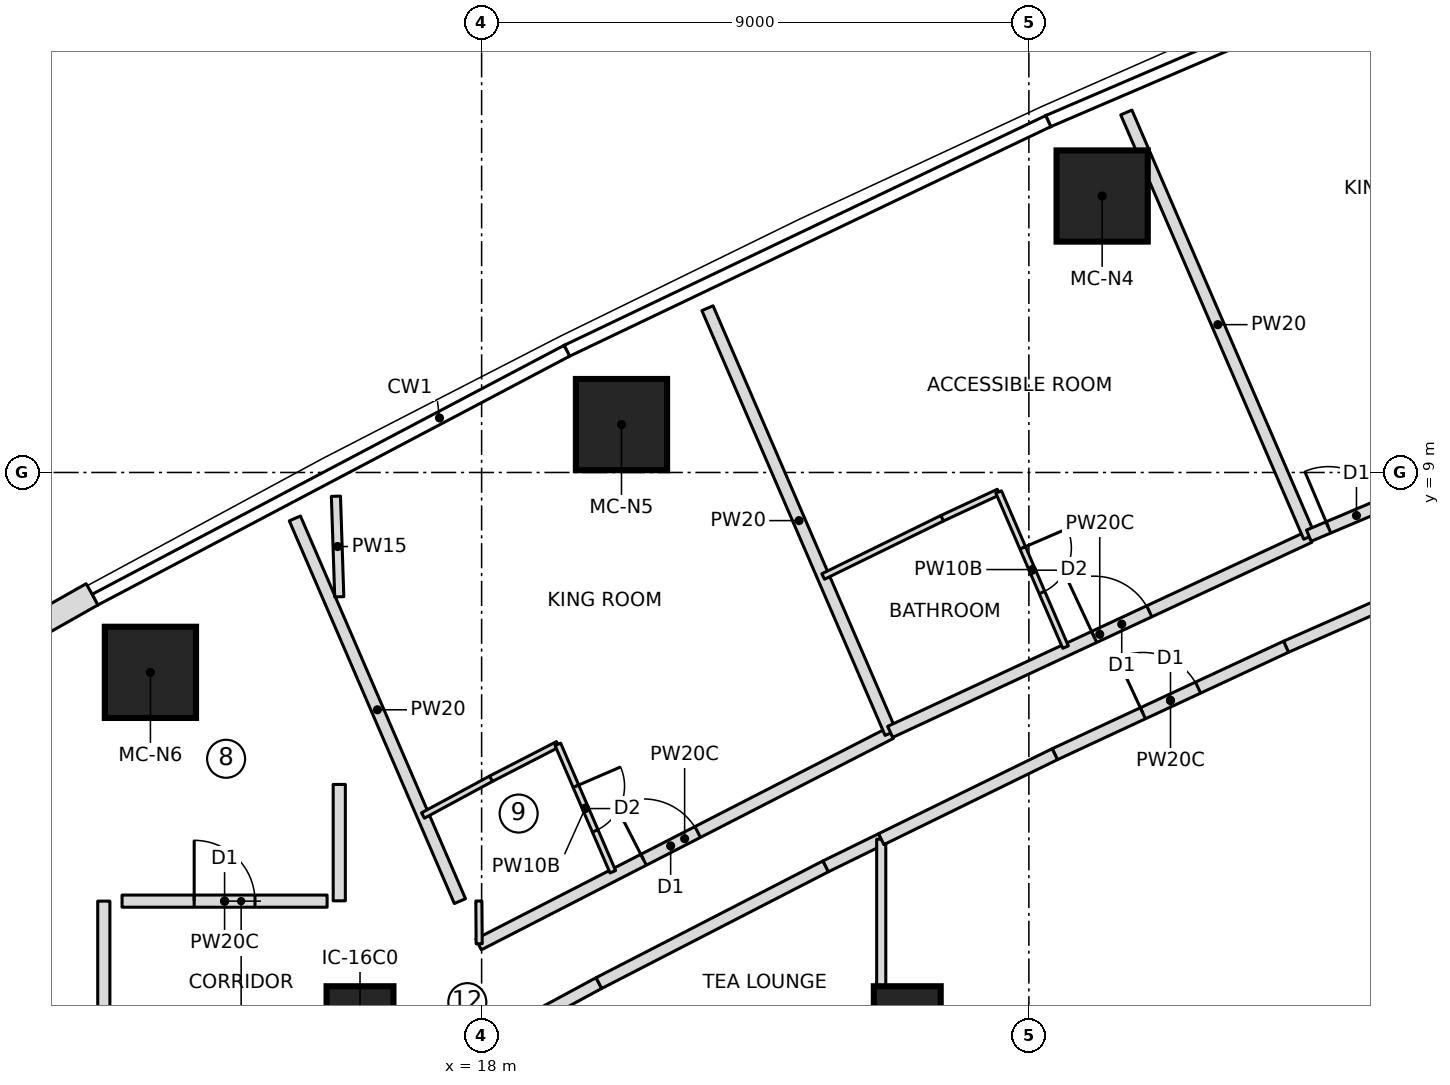
"""IFC4 building model, lengths in metres.
Left out: names, types, materials, properties, quantities, classifications, styles, units other than length and angle.
Written with IfcOpenShell. Run it as: python <this file> out.ifc"""

import sys

from ifc_helpers import new_model, si_unit, direction, frame, frame_2d, origin, origin_2d, place, context, subcontext, project, spatial, polyline, rectangle, outline, extrude, element, fill, save


model = new_model("IFC4")
c1 = context("Model", 3, precision=1e-05, world=origin(), true_north=direction((0.0, 1.0)))
c2 = subcontext(c1, "Body", "Model", "MODEL_VIEW")
j1 = project(units=[si_unit("LENGTHUNIT", "METRE"), si_unit("PLANEANGLEUNIT", "RADIAN")], contexts=[c1])
p1 = place(None, origin())
s1 = spatial("IfcSite", under=j1, at=p1, CompositionType="ELEMENT")
p2 = place(p1, origin())
s2 = spatial("IfcBuilding", under=s1, at=p2, CompositionType="ELEMENT")
p3 = place(p2, frame((0.0, 0.0, 162.15)))
s3 = spatial("IfcBuildingStorey", under=s2, at=p3, CompositionType="ELEMENT", Elevation=162.15)
for number, where, z_axis, x_axis in (
    (1, (28.205, 13.547, 0.0), (0.0, 0.0, 1.0), (1.0, 0.0, 0.0)),
    (2, (20.3, 9.788, 0.0), (0.0, 0.0, 1.0), (1.0, 0.0, 0.0)),
    (3, (12.553, 5.713, 0.0), (0.0, 0.0, 1.0), (1.0, 0.0, 0.0)),
):
    element("IfcColumn", number, at=place(p3, frame(where, z_axis=z_axis, x_axis=x_axis)), inside=s3, PredefinedType="COLUMN", context=c2, shape_type="SweptSolid", body=[
        extrude(rectangle(XDim=1.5, YDim=1.5, at=origin_2d()), origin(), (0.0, 0.0, 1.0), 3.55),
    ])
for number, where, z_axis, x_axis in (
    (4, (16.0, 0.0, 0.0), (0.0, 0.0, 1.0), (1.0, 0.0, 0.0)),
    (5, (25.0, 0.0, 0.0), (0.0, 0.0, 1.0), (1.0, 0.0, 0.0)),
):
    element("IfcColumn", number, at=place(p3, frame(where, z_axis=z_axis, x_axis=x_axis)), inside=s3, PredefinedType="COLUMN", context=c2, shape_type="SweptSolid", body=[
        extrude(rectangle(XDim=1.1, YDim=1.1, at=origin_2d()), origin(), (0.0, 0.0, 1.0), 3.55),
    ])
p4 = place(p3, frame((11.594, 6.997, 0.0), z_axis=(0.0, 0.0, 1.0), x_axis=(-0.870045255208, -0.492971859125, 0.0)))
e6 = element("IfcWall", 6, at=p4, inside=s3, PredefinedType="NOTDEFINED", context=c2, shape_type="SweptSolid", body=[
    extrude(outline(polyline([(0.0, -0.2), (4.424, -0.2), (4.352, 0.2), (0.0, 0.2), (0.0, -0.2)])), origin(), (0.0, 0.0, 1.0), 3.25),
])
p5 = place(p4, frame((1.094, 0.0, 0.6)))
e7 = element("IfcOpeningElement", 7, at=p5, cuts=e6, PredefinedType="OPENING", context=c2, shape_type="SweptSolid", body=[
    extrude(outline(polyline([(0.0, 1.35), (0.084, 1.771), (0.322, 2.128), (0.679, 2.366), (1.1, 2.45), (1.521, 2.366), (1.878, 2.128), (2.116, 1.771), (2.2, 1.35), (2.2, 1.1), (2.116, 0.679), (1.878, 0.322), (1.521, 0.084), (1.1, 0.0), (0.679, 0.084), (0.322, 0.322), (0.084, 0.679), (0.0, 1.1), (0.0, 1.35)])), frame((0.0, 0.21, 0.0), z_axis=(0.0, -1.0, 0.0), x_axis=(1.0, 0.0, 0.0)), (0.0, 0.0, 1.0), 0.42),
])
p6 = place(p3, frame((12.087, 1.95, 0.0), z_axis=(0.0, 0.0, 1.0), x_axis=(1.0, 0.0, 0.0)))
e8 = element("IfcWall", 8, at=p6, inside=s3, PredefinedType="PARTITIONING", context=c2, shape_type="SweptSolid", body=[
    extrude(rectangle(XDim=3.372, YDim=0.2, at=frame_2d((1.686, 0.0))), origin(), (0.0, 0.0, 1.0), 3.15),
])
p7 = place(p6, frame((1.186, 0.0, 0.0)))
e9 = element("IfcOpeningElement", 9, at=p7, cuts=e8, PredefinedType="OPENING", context=c2, shape_type="SweptSolid", body=[
    extrude(rectangle(XDim=1.0, YDim=2.1, at=frame_2d((0.5, 1.05))), frame((0.0, 0.11, 0.0), z_axis=(0.0, -1.0, 0.0), x_axis=(1.0, 0.0, 0.0)), (0.0, 0.0, 1.0), 0.22),
])
p8 = place(p3, frame((11.787, -1.95, 0.0), z_axis=(0.0, 0.0, 1.0), x_axis=(0.0, 1.0, 0.0)))
e10 = element("IfcWall", 10, at=p8, inside=s3, PredefinedType="PARTITIONING", context=c2, shape_type="SweptSolid", body=[
    extrude(rectangle(XDim=3.9, YDim=0.2, at=frame_2d((1.95, 0.0))), origin(), (0.0, 0.0, 1.0), 3.15),
])
p9 = place(p8, frame((0.4, 0.0, 0.0)))
e11 = element("IfcOpeningElement", 11, at=p9, cuts=e10, PredefinedType="OPENING", context=c2, shape_type="SweptSolid", body=[
    extrude(rectangle(XDim=1.0, YDim=2.1, at=frame_2d((0.5, 1.05))), frame((0.0, 0.11, 0.0), z_axis=(0.0, -1.0, 0.0), x_axis=(1.0, 0.0, 0.0)), (0.0, 0.0, 1.0), 0.22),
])
p10 = place(p3, frame((17.643, 1.95, 0.0), z_axis=(0.0, 0.0, 1.0), x_axis=(-0.395994543879, 0.918252863441, 0.0)))
e12 = element("IfcWall", 12, at=p10, inside=s3, PredefinedType="PARTITIONING", context=c2, shape_type="SweptSolid", body=[
    extrude(rectangle(XDim=6.854, YDim=0.2, at=frame_2d((3.427, 0.0))), origin(), (0.0, 0.0, 1.0), 3.15),
])
p11 = place(p3, frame((17.95, 1.238, 0.0), z_axis=(0.0, 0.0, 1.0), x_axis=(0.889731352077, 0.456484524525, 0.0)))
e13 = element("IfcWall", 13, at=p11, inside=s3, PredefinedType="PARTITIONING", context=c2, shape_type="SweptSolid", body=[
    extrude(rectangle(XDim=7.617, YDim=0.2, at=frame_2d((3.809, 0.0))), origin(), (0.0, 0.0, 1.0), 3.15),
])
p12 = place(p11, frame((3.05, 0.0, 0.0)))
e14 = element("IfcOpeningElement", 14, at=p12, cuts=e13, PredefinedType="OPENING", context=c2, shape_type="SweptSolid", body=[
    extrude(rectangle(XDim=1.0, YDim=2.1, at=frame_2d((0.5, 1.05))), frame((0.0, 0.11, 0.0), z_axis=(0.0, -1.0, 0.0), x_axis=(1.0, 0.0, 0.0)), (0.0, 0.0, 1.0), 0.22),
])
p13 = place(p3, frame((17.036, 3.358, 0.0), z_axis=(0.0, 0.0, 1.0), x_axis=(0.879823588489, 0.475300382009, 0.0)))
e15 = element("IfcWall", 15, at=p13, inside=s3, PredefinedType="PARTITIONING", context=c2, shape_type="SweptSolid", body=[
    extrude(rectangle(XDim=1.273, YDim=0.1, at=frame_2d((0.636, 0.0))), origin(), (0.0, 0.0, 1.0), 3.15),
])
p14 = place(p3, frame((18.156, 3.963, 0.0), z_axis=(0.0, 0.0, 1.0), x_axis=(0.889106231322, 0.457700895154, 0.0)))
e16 = element("IfcWall", 16, at=p14, inside=s3, PredefinedType="PARTITIONING", context=c2, shape_type="SweptSolid", body=[
    extrude(rectangle(XDim=1.235, YDim=0.1, at=frame_2d((0.617, 0.0))), origin(), (0.0, 0.0, 1.0), 3.15),
])
p15 = place(p3, frame((19.254, 4.529, 0.0), z_axis=(0.0, 0.0, 1.0), x_axis=(0.395958457437, -0.9182684248, 0.0)))
e17 = element("IfcWall", 17, at=p15, inside=s3, PredefinedType="PARTITIONING", context=c2, shape_type="SweptSolid", body=[
    extrude(rectangle(XDim=2.282, YDim=0.1, at=frame_2d((1.141, 0.0))), origin(), (0.0, 0.0, 1.0), 3.15),
])
p16 = place(p15, frame((0.75, 0.0, 0.0)))
e18 = element("IfcOpeningElement", 18, at=p16, cuts=e17, PredefinedType="OPENING", context=c2, shape_type="SweptSolid", body=[
    extrude(rectangle(XDim=0.8, YDim=2.1, at=frame_2d((0.4, 1.05))), frame((0.0, 0.06, 0.0), z_axis=(0.0, -1.0, 0.0), x_axis=(1.0, 0.0, 0.0)), (0.0, 0.0, 1.0), 0.12),
])
p17 = place(p3, frame((24.727, 4.715, 0.0), z_axis=(0.0, 0.0, 1.0), x_axis=(-0.395982367396, 0.918258114427, 0.0)))
e19 = element("IfcWall", 19, at=p17, inside=s3, PredefinedType="PARTITIONING", context=c2, shape_type="SweptSolid", body=[
    extrude(rectangle(XDim=7.609, YDim=0.2, at=frame_2d((3.804, 0.0))), origin(), (0.0, 0.0, 1.0), 3.15),
])
p18 = place(p3, frame((24.719, 4.733, 0.0), z_axis=(0.0, 0.0, 1.0), x_axis=(0.906593711122, 0.422004553238, 0.0)))
e20 = element("IfcWall", 20, at=p18, inside=s3, PredefinedType="PARTITIONING", context=c2, shape_type="SweptSolid", body=[
    extrude(rectangle(XDim=7.603, YDim=0.2, at=frame_2d((3.802, 0.0))), origin(), (0.0, 0.0, 1.0), 3.15),
])
p19 = place(p18, frame((3.7, 0.0, 0.0)))
e21 = element("IfcOpeningElement", 21, at=p19, cuts=e20, PredefinedType="OPENING", context=c2, shape_type="SweptSolid", body=[
    extrude(rectangle(XDim=1.0, YDim=2.1, at=frame_2d((0.5, 1.05))), frame((0.0, 0.11, 0.0), z_axis=(0.0, -1.0, 0.0), x_axis=(1.0, 0.0, 0.0)), (0.0, 0.0, 1.0), 0.22),
])
p20 = place(p3, frame((23.617, 7.289, 0.0), z_axis=(0.0, 0.0, 1.0), x_axis=(0.898158387811, 0.439672048696, 0.0)))
e22 = element("IfcWall", 22, at=p20, inside=s3, PredefinedType="PARTITIONING", context=c2, shape_type="SweptSolid", body=[
    extrude(rectangle(XDim=2.18, YDim=0.1, at=frame_2d((1.09, 0.0))), origin(), (0.0, 0.0, 1.0), 3.15),
])
p21 = place(p3, frame((25.575, 8.248, 0.0), z_axis=(0.0, 0.0, 1.0), x_axis=(0.906901476145, 0.421342749512, 0.0)))
e23 = element("IfcWall", 23, at=p21, inside=s3, PredefinedType="PARTITIONING", context=c2, shape_type="SweptSolid", body=[
    extrude(rectangle(XDim=1.023, YDim=0.1, at=frame_2d((0.511, 0.0))), origin(), (0.0, 0.0, 1.0), 3.15),
])
p22 = place(p3, frame((26.503, 8.679, 0.0), z_axis=(0.0, 0.0, 1.0), x_axis=(0.396018464604, -0.918242547311, 0.0)))
e24 = element("IfcWall", 24, at=p22, inside=s3, PredefinedType="PARTITIONING", context=c2, shape_type="SweptSolid", body=[
    extrude(rectangle(XDim=2.778, YDim=0.1, at=frame_2d((1.389, 0.0))), origin(), (0.0, 0.0, 1.0), 3.15),
])
p23 = place(p22, frame((1.0, 0.0, 0.0)))
e25 = element("IfcOpeningElement", 25, at=p23, cuts=e24, PredefinedType="OPENING", context=c2, shape_type="SweptSolid", body=[
    extrude(rectangle(XDim=0.8, YDim=2.1, at=frame_2d((0.4, 1.05))), frame((0.0, 0.06, 0.0), z_axis=(0.0, -1.0, 0.0), x_axis=(1.0, 0.0, 0.0)), (0.0, 0.0, 1.0), 0.12),
])
p24 = place(p3, frame((31.612, 7.942, 0.0), z_axis=(0.0, 0.0, 1.0), x_axis=(-0.395976934703, 0.91826045716, 0.0)))
e26 = element("IfcWall", 26, at=p24, inside=s3, PredefinedType="PARTITIONING", context=c2, shape_type="SweptSolid", body=[
    extrude(rectangle(XDim=7.6, YDim=0.2, at=frame_2d((3.8, 0.0))), origin(), (0.0, 0.0, 1.0), 3.15),
])
p25 = place(p3, frame((31.604, 7.96, 0.0), z_axis=(0.0, 0.0, 1.0), x_axis=(0.921069634751, 0.389397904386, 0.0)))
e27 = element("IfcWall", 27, at=p25, inside=s3, PredefinedType="PARTITIONING", context=c2, shape_type="SweptSolid", body=[
    extrude(rectangle(XDim=7.6, YDim=0.2, at=frame_2d((3.8, 0.0))), origin(), (0.0, 0.0, 1.0), 3.15),
])
p26 = place(p25, frame((0.35, 0.0, 0.0)))
e28 = element("IfcOpeningElement", 28, at=p26, cuts=e27, PredefinedType="OPENING", context=c2, shape_type="SweptSolid", body=[
    extrude(rectangle(XDim=1.0, YDim=2.1, at=frame_2d((0.5, 1.05))), frame((0.0, 0.11, 0.0), z_axis=(0.0, -1.0, 0.0), x_axis=(1.0, 0.0, 0.0)), (0.0, 0.0, 1.0), 0.22),
])
p27 = place(p3, frame((18.814, 0.0, 0.0), z_axis=(0.0, 0.0, 1.0), x_axis=(0.879832865766, 0.475283208538, 0.0)))
e29 = element("IfcWall", 29, at=p27, inside=s3, PredefinedType="PARTITIONING", context=c2, shape_type="SweptSolid", body=[
    extrude(rectangle(XDim=1.267, YDim=0.2, at=frame_2d((0.633, 0.0))), origin(), (0.0, 0.0, 1.0), 3.15),
])
p28 = place(p3, frame((19.928, 0.602, 0.0), z_axis=(0.0, 0.0, 1.0), x_axis=(0.889140337289, 0.457634636589, 0.0)))
e30 = element("IfcWall", 30, at=p28, inside=s3, PredefinedType="PARTITIONING", context=c2, shape_type="SweptSolid", body=[
    extrude(rectangle(XDim=4.195, YDim=0.2, at=frame_2d((2.098, 0.0))), origin(), (0.0, 0.0, 1.0), 3.15),
])
p29 = place(p3, frame((23.659, 2.522, 0.0), z_axis=(0.0, 0.0, 1.0), x_axis=(0.898188484258, 0.439610562597, 0.0)))
e31 = element("IfcWall", 31, at=p29, inside=s3, PredefinedType="PARTITIONING", context=c2, shape_type="SweptSolid", body=[
    extrude(rectangle(XDim=1.017, YDim=0.2, at=frame_2d((0.508, 0.0))), origin(), (0.0, 0.0, 1.0), 3.15),
])
p30 = place(p3, frame((24.572, -2.969, 0.0), z_axis=(0.0, 0.0, 1.0), x_axis=(0.0, 1.0, 0.0)))
e32 = element("IfcWall", 32, at=p30, inside=s3, PredefinedType="PARTITIONING", context=c2, shape_type="SweptSolid", body=[
    extrude(rectangle(XDim=5.938, YDim=0.15, at=frame_2d((2.969, 0.0))), origin(), (0.0, 0.0, 1.0), 3.15),
])
p31 = place(p3, frame((27.427, 4.367, 0.0), z_axis=(0.0, 0.0, 1.0), x_axis=(0.906830275285, 0.421495968933, 0.0)))
e33 = element("IfcWall", 33, at=p31, inside=s3, PredefinedType="PARTITIONING", context=c2, shape_type="SweptSolid", body=[
    extrude(rectangle(XDim=4.195, YDim=0.2, at=frame_2d((2.098, 0.0))), origin(), (0.0, 0.0, 1.0), 3.15),
])
p32 = place(p31, frame((1.598, 0.0, 0.0)))
e34 = element("IfcOpeningElement", 34, at=p32, cuts=e33, PredefinedType="OPENING", context=c2, shape_type="SweptSolid", body=[
    extrude(rectangle(XDim=1.0, YDim=2.1, at=frame_2d((0.5, 1.05))), frame((0.0, 0.11, 0.0), z_axis=(0.0, -1.0, 0.0), x_axis=(1.0, 0.0, 0.0)), (0.0, 0.0, 1.0), 0.22),
])
p33 = place(p3, frame((31.231, 6.135, 0.0), z_axis=(0.0, 0.0, 1.0), x_axis=(0.915102334452, 0.403221672881, 0.0)))
e35 = element("IfcWall", 35, at=p33, inside=s3, PredefinedType="PARTITIONING", context=c2, shape_type="SweptSolid", body=[
    extrude(rectangle(XDim=2.269, YDim=0.2, at=frame_2d((1.135, 0.0))), origin(), (0.0, 0.0, 1.0), 3.15),
])
p34 = place(p3, frame((24.572, 2.969, 0.0), z_axis=(0.0, 0.0, 1.0), x_axis=(0.898128954367, 0.439732169995, 0.0)))
e36 = element("IfcWall", 36, at=p34, inside=s3, PredefinedType="PARTITIONING", context=c2, shape_type="SweptSolid", body=[
    extrude(rectangle(XDim=3.178, YDim=0.2, at=frame_2d((1.589, 0.0))), origin(), (0.0, 0.0, 1.0), 3.15),
])
p35 = place(p3, frame((15.604, 8.609, 0.0), z_axis=(0.0, 0.0, 1.0), x_axis=(0.033196927484, -0.999448830109, 0.0)))
e37 = element("IfcWall", 37, at=p35, inside=s3, PredefinedType="PARTITIONING", context=c2, shape_type="SweptSolid", body=[
    extrude(rectangle(XDim=1.655, YDim=0.15, at=frame_2d((0.827, 0.0))), origin(), (0.0, 0.0, 1.0), 3.15),
])
p36 = place(p3, frame((17.96, 1.249, 0.0), z_axis=(0.0, 0.0, 1.0), x_axis=(-0.007291472831, 0.999973416859, 0.0)))
e38 = element("IfcWall", 38, at=p36, inside=s3, PredefinedType="PARTITIONING", context=c2, shape_type="SweptSolid", body=[
    extrude(rectangle(XDim=0.703, YDim=0.1, at=frame_2d((0.352, 0.0))), origin(), (0.0, 0.0, 1.0), 3.15),
])
p37 = place(p3, frame((15.659, 3.869, 0.0), z_axis=(0.0, 0.0, 1.0), x_axis=(0.0, -1.0, 0.0)))
e39 = element("IfcWall", 39, at=p37, inside=s3, PredefinedType="PARTITIONING", context=c2, shape_type="SweptSolid", body=[
    extrude(rectangle(XDim=1.914, YDim=0.2, at=frame_2d((0.957, 0.0))), origin(), (0.0, 0.0, 1.0), 3.15),
])
p38 = place(p7, origin())
e40 = element("IfcDoor", 40, at=p38, inside=s3, OperationType="SINGLE_SWING_LEFT", PredefinedType="DOOR", context=c2, shape_type="SweptSolid", body=[
    extrude(rectangle(XDim=1.0, YDim=2.1, at=frame_2d((0.5, 1.05))), frame((0.0, 0.025, 0.0), z_axis=(0.0, -1.0, 0.0), x_axis=(1.0, 0.0, 0.0)), (0.0, 0.0, 1.0), 0.05),
])
fill(e9, e40)
p39 = place(p16, origin())
e41 = element("IfcDoor", 41, at=p39, inside=s3, OperationType="SINGLE_SWING_LEFT", PredefinedType="DOOR", context=c2, shape_type="SweptSolid", body=[
    extrude(rectangle(XDim=0.8, YDim=2.1, at=frame_2d((0.4, 1.05))), frame((0.0, 0.025, 0.0), z_axis=(0.0, -1.0, 0.0), x_axis=(1.0, 0.0, 0.0)), (0.0, 0.0, 1.0), 0.05),
])
fill(e18, e41)
p40 = place(p12, origin())
e42 = element("IfcDoor", 42, at=p40, inside=s3, OperationType="SINGLE_SWING_LEFT", PredefinedType="DOOR", context=c2, shape_type="SweptSolid", body=[
    extrude(rectangle(XDim=1.0, YDim=2.1, at=frame_2d((0.5, 1.05))), frame((0.0, 0.025, 0.0), z_axis=(0.0, -1.0, 0.0), x_axis=(1.0, 0.0, 0.0)), (0.0, 0.0, 1.0), 0.05),
])
fill(e14, e42)
p41 = place(p23, origin())
e43 = element("IfcDoor", 43, at=p41, inside=s3, OperationType="SINGLE_SWING_LEFT", PredefinedType="DOOR", context=c2, shape_type="SweptSolid", body=[
    extrude(rectangle(XDim=0.8, YDim=2.1, at=frame_2d((0.4, 1.05))), frame((0.0, 0.025, 0.0), z_axis=(0.0, -1.0, 0.0), x_axis=(1.0, 0.0, 0.0)), (0.0, 0.0, 1.0), 0.05),
])
fill(e25, e43)
p42 = place(p19, origin())
e44 = element("IfcDoor", 44, at=p42, inside=s3, OperationType="SINGLE_SWING_LEFT", PredefinedType="DOOR", context=c2, shape_type="SweptSolid", body=[
    extrude(rectangle(XDim=1.0, YDim=2.1, at=frame_2d((0.5, 1.05))), frame((0.0, 0.025, 0.0), z_axis=(0.0, -1.0, 0.0), x_axis=(1.0, 0.0, 0.0)), (0.0, 0.0, 1.0), 0.05),
])
fill(e21, e44)
p43 = place(p26, origin())
e45 = element("IfcDoor", 45, at=p43, inside=s3, OperationType="SINGLE_SWING_LEFT", PredefinedType="DOOR", context=c2, shape_type="SweptSolid", body=[
    extrude(rectangle(XDim=1.0, YDim=2.1, at=frame_2d((0.5, 1.05))), frame((0.0, 0.025, 0.0), z_axis=(0.0, -1.0, 0.0), x_axis=(1.0, 0.0, 0.0)), (0.0, 0.0, 1.0), 0.05),
])
fill(e28, e45)
p44 = place(p32, origin())
e46 = element("IfcDoor", 46, at=p44, inside=s3, OperationType="SINGLE_SWING_LEFT", PredefinedType="DOOR", context=c2, shape_type="SweptSolid", body=[
    extrude(rectangle(XDim=1.0, YDim=2.1, at=frame_2d((0.5, 1.05))), frame((0.0, 0.025, 0.0), z_axis=(0.0, -1.0, 0.0), x_axis=(1.0, 0.0, 0.0)), (0.0, 0.0, 1.0), 0.05),
])
fill(e34, e46)
save(model, sys.argv[1])
